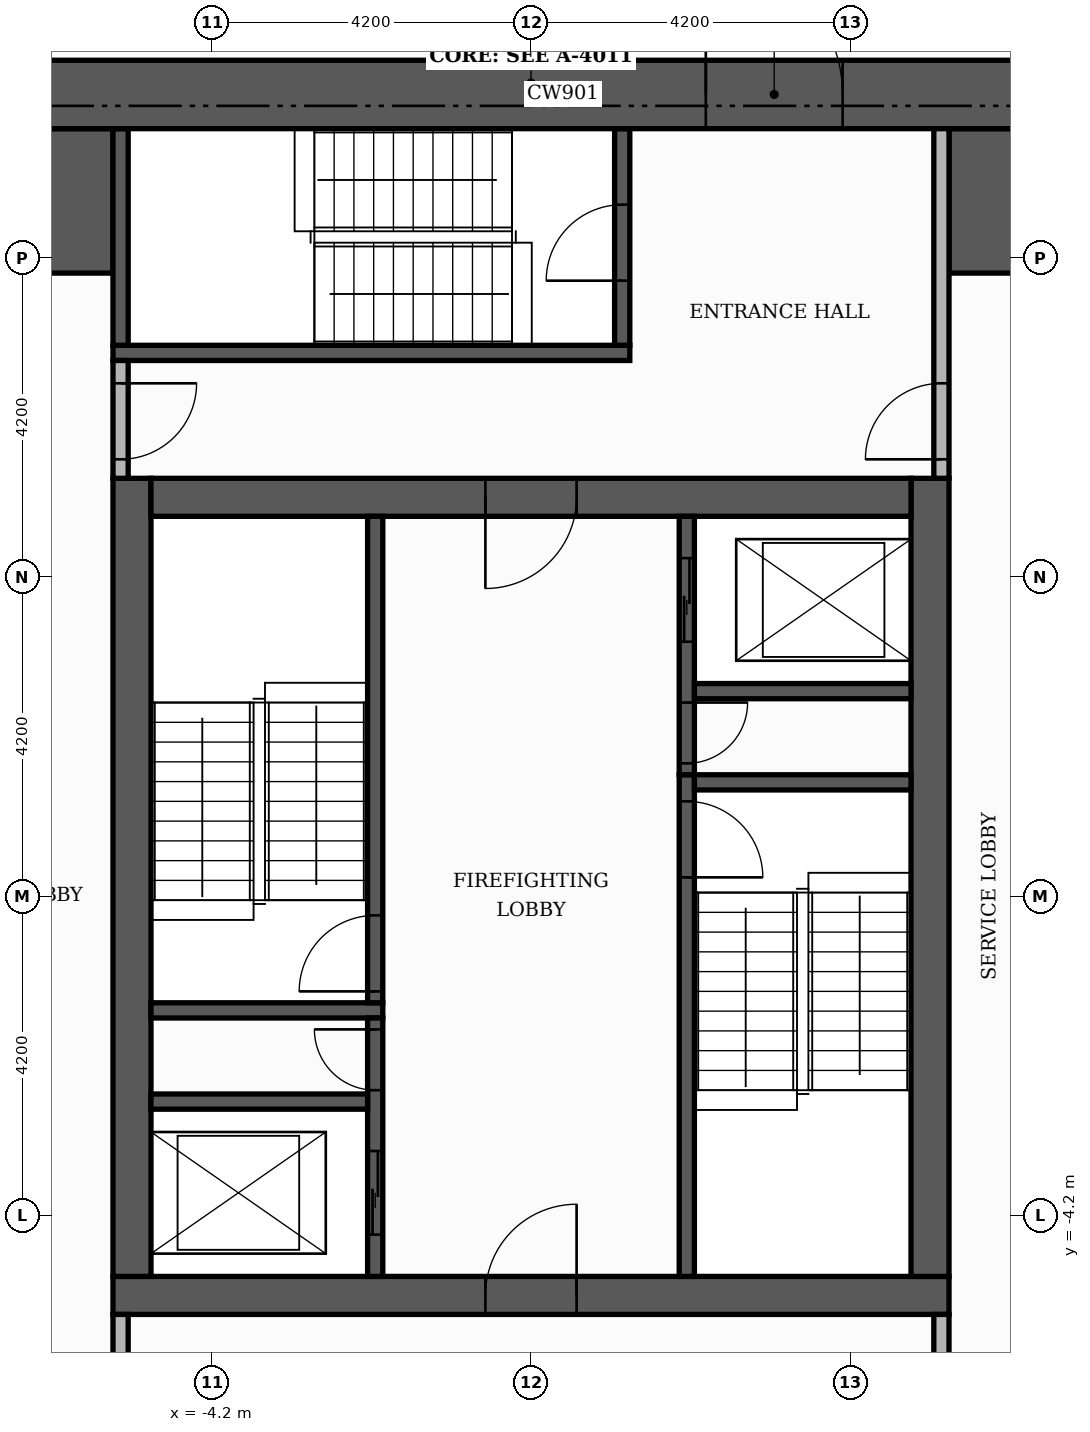
"""IFC4 building model, lengths in metres.
Left out: names, types, materials, properties, quantities, classifications, styles, units other than length and angle.
Written with IfcOpenShell. Run it as: python <this file> out.ifc"""

import sys

from ifc_helpers import new_model, si_unit, direction, frame, frame_2d, origin, place, context, subcontext, project, spatial, rectangle, extrude, element, fill, save


model = new_model("IFC4")
c1 = context("Model", 3, precision=1e-05, world=origin(), true_north=direction((0.0, 1.0)))
c2 = subcontext(c1, "Body", "Model", "MODEL_VIEW")
j1 = project(units=[si_unit("LENGTHUNIT", "METRE"), si_unit("PLANEANGLEUNIT", "RADIAN")], contexts=[c1])
p1 = place(None, origin())
s1 = spatial("IfcSite", under=j1, at=p1, CompositionType="ELEMENT")
p2 = place(p1, origin())
s2 = spatial("IfcBuilding", under=s1, at=p2, CompositionType="ELEMENT")
p3 = place(p2, frame((0.0, 0.0, 62.1)))
s3 = spatial("IfcBuildingStorey", under=s2, at=p3, CompositionType="ELEMENT", Elevation=62.1)
p4 = place(p3, frame((-5.5, -5.25, 0.0), z_axis=(0.0, 0.0, 1.0), x_axis=(1.0, 0.0, 0.0)))
e1 = element("IfcWall", 1, at=p4, inside=s3, PredefinedType="SHEAR", context=c2, shape_type="SweptSolid", body=[
    extrude(rectangle(XDim=11.0, YDim=0.5, at=frame_2d((5.5, 0.0))), origin(), (0.0, 0.0, 1.0), 3.48),
])
p5 = place(p4, frame((4.9, 0.0, 0.0)))
e2 = element("IfcOpeningElement", 2, at=p5, cuts=e1, PredefinedType="OPENING", context=c2, shape_type="SweptSolid", body=[
    extrude(rectangle(XDim=1.2, YDim=2.1, at=frame_2d((0.6, 1.05))), frame((0.0, 0.26, 0.0), z_axis=(0.0, -1.0, 0.0), x_axis=(1.0, 0.0, 0.0)), (0.0, 0.0, 1.0), 0.52),
])
for number, where, z_axis, x_axis in (
    (3, (-5.25, -5.0, 0.0), (0.0, 0.0, 1.0), (0.0, 1.0, 0.0)),
    (4, (5.25, -5.0, 0.0), (0.0, 0.0, 1.0), (0.0, 1.0, 0.0)),
):
    element("IfcWall", number, at=place(p3, frame(where, z_axis=z_axis, x_axis=x_axis)), inside=s3, PredefinedType="SHEAR", context=c2, shape_type="SweptSolid", body=[
        extrude(rectangle(XDim=10.5, YDim=0.5, at=frame_2d((5.25, 0.0))), origin(), (0.0, 0.0, 1.0), 3.48),
    ])
p6 = place(p3, frame((-5.0, 5.25, 0.0), z_axis=(0.0, 0.0, 1.0), x_axis=(1.0, 0.0, 0.0)))
e5 = element("IfcWall", 5, at=p6, inside=s3, PredefinedType="SHEAR", context=c2, shape_type="SweptSolid", body=[
    extrude(rectangle(XDim=10.0, YDim=0.5, at=frame_2d((5.0, 0.0))), origin(), (0.0, 0.0, 1.0), 3.48),
])
p7 = place(p6, frame((4.4, 0.0, 0.0)))
e6 = element("IfcOpeningElement", 6, at=p7, cuts=e5, PredefinedType="OPENING", context=c2, shape_type="SweptSolid", body=[
    extrude(rectangle(XDim=1.2, YDim=2.1, at=frame_2d((0.6, 1.05))), frame((0.0, 0.26, 0.0), z_axis=(0.0, -1.0, 0.0), x_axis=(1.0, 0.0, 0.0)), (0.0, 0.0, 1.0), 0.52),
])
for number, where, z_axis, x_axis in (
    (7, (-10.1, 9.15, 0.0), (0.0, 0.0, 1.0), (1.0, 0.0, 0.0)),
    (8, (5.5, 9.15, 0.0), (0.0, 0.0, 1.0), (1.0, 0.0, 0.0)),
):
    element("IfcWall", number, at=place(p3, frame(where, z_axis=z_axis, x_axis=x_axis)), inside=s3, PredefinedType="SHEAR", context=c2, shape_type="SweptSolid", body=[
        extrude(rectangle(XDim=4.6, YDim=1.9, at=frame_2d((2.3, 0.0))), origin(), (0.0, 0.0, 1.0), 3.48),
    ])
p8 = place(p3, frame((2.05, -5.0, 0.0), z_axis=(0.0, 0.0, 1.0), x_axis=(0.0, 1.0, 0.0)))
e9 = element("IfcWall", 9, at=p8, inside=s3, PredefinedType="SHEAR", context=c2, shape_type="SweptSolid", body=[
    extrude(rectangle(XDim=6.6, YDim=0.2, at=frame_2d((3.3, 0.0))), origin(), (0.0, 0.0, 1.0), 3.48),
])
p9 = place(p8, frame((5.25, 0.0, 0.0)))
e10 = element("IfcOpeningElement", 10, at=p9, cuts=e9, PredefinedType="OPENING", context=c2, shape_type="SweptSolid", body=[
    extrude(rectangle(XDim=1.0, YDim=2.1, at=frame_2d((0.5, 1.05))), frame((0.0, 0.11, 0.0), z_axis=(0.0, -1.0, 0.0), x_axis=(1.0, 0.0, 0.0)), (0.0, 0.0, 1.0), 0.22),
])
p10 = place(p3, frame((-5.0, -1.5, 0.0), z_axis=(0.0, 0.0, 1.0), x_axis=(1.0, 0.0, 0.0)))
e11 = element("IfcWall", 11, at=p10, inside=s3, PredefinedType="SHEAR", context=c2, shape_type="SweptSolid", body=[
    extrude(rectangle(XDim=3.05, YDim=0.2, at=frame_2d((1.525, 0.0))), origin(), (0.0, 0.0, 1.0), 3.48),
])
p11 = place(p3, frame((-2.05, -1.4, 0.0), z_axis=(0.0, 0.0, 1.0), x_axis=(0.0, 1.0, 0.0)))
e12 = element("IfcWall", 12, at=p11, inside=s3, PredefinedType="SHEAR", context=c2, shape_type="SweptSolid", body=[
    extrude(rectangle(XDim=6.4, YDim=0.2, at=frame_2d((3.2, 0.0))), origin(), (0.0, 0.0, 1.0), 3.48),
])
p12 = place(p11, frame((0.15, 0.0, 0.0)))
e13 = element("IfcOpeningElement", 13, at=p12, cuts=e12, PredefinedType="OPENING", context=c2, shape_type="SweptSolid", body=[
    extrude(rectangle(XDim=1.0, YDim=2.1, at=frame_2d((0.5, 1.05))), frame((0.0, 0.11, 0.0), z_axis=(0.0, -1.0, 0.0), x_axis=(1.0, 0.0, 0.0)), (0.0, 0.0, 1.0), 0.22),
])
p13 = place(p3, frame((2.15, 1.5, 0.0), z_axis=(0.0, 0.0, 1.0), x_axis=(1.0, 0.0, 0.0)))
e14 = element("IfcWall", 14, at=p13, inside=s3, PredefinedType="SHEAR", context=c2, shape_type="SweptSolid", body=[
    extrude(rectangle(XDim=2.85, YDim=0.2, at=frame_2d((1.425, 0.0))), origin(), (0.0, 0.0, 1.0), 3.48),
])
p14 = place(p3, frame((-5.5, 7.15, 0.0), z_axis=(0.0, 0.0, 1.0), x_axis=(1.0, 0.0, 0.0)))
e15 = element("IfcWall", 15, at=p14, inside=s3, PredefinedType="SHEAR", context=c2, shape_type="SweptSolid", body=[
    extrude(rectangle(XDim=6.8, YDim=0.2, at=frame_2d((3.4, 0.0))), origin(), (0.0, 0.0, 1.0), 3.48),
])
p15 = place(p3, frame((-5.4, 7.25, 0.0), z_axis=(0.0, 0.0, 1.0), x_axis=(0.0, 1.0, 0.0)))
e16 = element("IfcWall", 16, at=p15, inside=s3, PredefinedType="SHEAR", context=c2, shape_type="SweptSolid", body=[
    extrude(rectangle(XDim=2.85, YDim=0.2, at=frame_2d((1.425, 0.0))), origin(), (0.0, 0.0, 1.0), 3.48),
])
p16 = place(p3, frame((1.2, 7.25, 0.0), z_axis=(0.0, 0.0, 1.0), x_axis=(0.0, 1.0, 0.0)))
e17 = element("IfcWall", 17, at=p16, inside=s3, PredefinedType="SHEAR", context=c2, shape_type="SweptSolid", body=[
    extrude(rectangle(XDim=2.85, YDim=0.2, at=frame_2d((1.425, 0.0))), origin(), (0.0, 0.0, 1.0), 3.48),
])
p17 = place(p16, frame((0.85, 0.0, 0.0)))
e18 = element("IfcOpeningElement", 18, at=p17, cuts=e17, PredefinedType="OPENING", context=c2, shape_type="SweptSolid", body=[
    extrude(rectangle(XDim=1.0, YDim=2.1, at=frame_2d((0.5, 1.05))), frame((0.0, 0.11, 0.0), z_axis=(0.0, -1.0, 0.0), x_axis=(1.0, 0.0, 0.0)), (0.0, 0.0, 1.0), 0.22),
])
p18 = place(p3, frame((-2.05, -5.0, 0.0), z_axis=(0.0, 0.0, 1.0), x_axis=(0.0, 1.0, 0.0)))
e19 = element("IfcWall", 19, at=p18, inside=s3, PredefinedType="SHEAR", context=c2, shape_type="SweptSolid", body=[
    extrude(rectangle(XDim=3.4, YDim=0.2, at=frame_2d((1.7, 0.0))), origin(), (0.0, 0.0, 1.0), 3.48),
])
p19 = place(p18, frame((0.55, 0.0, 0.0)))
e20 = element("IfcOpeningElement", 20, at=p19, cuts=e19, PredefinedType="OPENING", context=c2, shape_type="SweptSolid", body=[
    extrude(rectangle(XDim=1.1, YDim=2.1, at=frame_2d((0.55, 1.05))), frame((0.0, 0.11, 0.0), z_axis=(0.0, -1.0, 0.0), x_axis=(1.0, 0.0, 0.0)), (0.0, 0.0, 1.0), 0.22),
])
p20 = place(p18, frame((2.45, 0.0, 0.0)))
e21 = element("IfcOpeningElement", 21, at=p20, cuts=e19, PredefinedType="OPENING", context=c2, shape_type="SweptSolid", body=[
    extrude(rectangle(XDim=0.8, YDim=2.1, at=frame_2d((0.4, 1.05))), frame((0.0, 0.11, 0.0), z_axis=(0.0, -1.0, 0.0), x_axis=(1.0, 0.0, 0.0)), (0.0, 0.0, 1.0), 0.22),
])
p21 = place(p3, frame((-5.0, -2.7, 0.0), z_axis=(0.0, 0.0, 1.0), x_axis=(1.0, 0.0, 0.0)))
e22 = element("IfcWall", 22, at=p21, inside=s3, PredefinedType="SHEAR", context=c2, shape_type="SweptSolid", body=[
    extrude(rectangle(XDim=2.85, YDim=0.2, at=frame_2d((1.425, 0.0))), origin(), (0.0, 0.0, 1.0), 3.48),
])
p22 = place(p3, frame((2.05, 1.6, 0.0), z_axis=(0.0, 0.0, 1.0), x_axis=(0.0, 1.0, 0.0)))
e23 = element("IfcWall", 23, at=p22, inside=s3, PredefinedType="SHEAR", context=c2, shape_type="SweptSolid", body=[
    extrude(rectangle(XDim=3.4, YDim=0.2, at=frame_2d((1.7, 0.0))), origin(), (0.0, 0.0, 1.0), 3.48),
])
p23 = place(p22, frame((1.75, 0.0, 0.0)))
e24 = element("IfcOpeningElement", 24, at=p23, cuts=e23, PredefinedType="OPENING", context=c2, shape_type="SweptSolid", body=[
    extrude(rectangle(XDim=1.1, YDim=2.1, at=frame_2d((0.55, 1.05))), frame((0.0, 0.11, 0.0), z_axis=(0.0, -1.0, 0.0), x_axis=(1.0, 0.0, 0.0)), (0.0, 0.0, 1.0), 0.22),
])
p24 = place(p22, frame((0.15, 0.0, 0.0)))
e25 = element("IfcOpeningElement", 25, at=p24, cuts=e23, PredefinedType="OPENING", context=c2, shape_type="SweptSolid", body=[
    extrude(rectangle(XDim=0.8, YDim=2.1, at=frame_2d((0.4, 1.05))), frame((0.0, 0.11, 0.0), z_axis=(0.0, -1.0, 0.0), x_axis=(1.0, 0.0, 0.0)), (0.0, 0.0, 1.0), 0.22),
])
p25 = place(p3, frame((2.15, 2.7, 0.0), z_axis=(0.0, 0.0, 1.0), x_axis=(1.0, 0.0, 0.0)))
e26 = element("IfcWall", 26, at=p25, inside=s3, PredefinedType="SHEAR", context=c2, shape_type="SweptSolid", body=[
    extrude(rectangle(XDim=2.85, YDim=0.2, at=frame_2d((1.425, 0.0))), origin(), (0.0, 0.0, 1.0), 3.48),
])
p26 = place(p3, frame((-11.0, 10.55, 0.0), z_axis=(0.0, 0.0, 1.0), x_axis=(1.0, 0.0, 0.0)))
e27 = element("IfcWall", 27, at=p26, inside=s3, PredefinedType="SHEAR", context=c2, shape_type="SweptSolid", body=[
    extrude(rectangle(XDim=22.0, YDim=0.9, at=frame_2d((11.0, 0.0))), origin(), (0.0, 0.0, 1.0), 3.48),
])
p27 = place(p26, frame((13.3, 0.0, 0.0)))
e28 = element("IfcOpeningElement", 28, at=p27, cuts=e27, PredefinedType="OPENING", context=c2, shape_type="SweptSolid", body=[
    extrude(rectangle(XDim=1.8, YDim=2.2, at=frame_2d((0.9, 1.1))), frame((0.0, 0.46, 0.0), z_axis=(0.0, -1.0, 0.0), x_axis=(1.0, 0.0, 0.0)), (0.0, 0.0, 1.0), 0.92),
])
p28 = place(p3, frame((-5.4, -10.1, 0.0), z_axis=(0.0, 0.0, 1.0), x_axis=(0.0, 1.0, 0.0)))
e29 = element("IfcWall", 29, at=p28, inside=s3, PredefinedType="PARTITIONING", context=c2, shape_type="SweptSolid", body=[
    extrude(rectangle(XDim=4.6, YDim=0.2, at=frame_2d((2.3, 0.0))), origin(), (0.0, 0.0, 1.0), 3.48),
])
p29 = place(p28, frame((2.9, 0.0, 0.0)))
e30 = element("IfcOpeningElement", 30, at=p29, cuts=e29, PredefinedType="OPENING", context=c2, shape_type="SweptSolid", body=[
    extrude(rectangle(XDim=1.0, YDim=2.1, at=frame_2d((0.5, 1.05))), frame((0.0, 0.11, 0.0), z_axis=(0.0, -1.0, 0.0), x_axis=(1.0, 0.0, 0.0)), (0.0, 0.0, 1.0), 0.22),
])
p30 = place(p3, frame((5.4, -7.9, 0.0), z_axis=(0.0, 0.0, 1.0), x_axis=(0.0, 1.0, 0.0)))
e31 = element("IfcWall", 31, at=p30, inside=s3, PredefinedType="PARTITIONING", context=c2, shape_type="SweptSolid", body=[
    extrude(rectangle(XDim=2.4, YDim=0.2, at=frame_2d((1.2, 0.0))), origin(), (0.0, 0.0, 1.0), 3.48),
])
p31 = place(p30, frame((0.7, 0.0, 0.0)))
e32 = element("IfcOpeningElement", 32, at=p31, cuts=e31, PredefinedType="OPENING", context=c2, shape_type="SweptSolid", body=[
    extrude(rectangle(XDim=1.0, YDim=2.1, at=frame_2d((0.5, 1.05))), frame((0.0, 0.11, 0.0), z_axis=(0.0, -1.0, 0.0), x_axis=(1.0, 0.0, 0.0)), (0.0, 0.0, 1.0), 0.22),
])
p32 = place(p3, frame((-5.4, 5.5, 0.0), z_axis=(0.0, 0.0, 1.0), x_axis=(0.0, 1.0, 0.0)))
e33 = element("IfcWall", 33, at=p32, inside=s3, PredefinedType="PARTITIONING", context=c2, shape_type="SweptSolid", body=[
    extrude(rectangle(XDim=1.55, YDim=0.2, at=frame_2d((0.775, 0.0))), origin(), (0.0, 0.0, 1.0), 3.48),
])
p33 = place(p32, frame((0.25, 0.0, 0.0)))
e34 = element("IfcOpeningElement", 34, at=p33, cuts=e33, PredefinedType="OPENING", context=c2, shape_type="SweptSolid", body=[
    extrude(rectangle(XDim=1.0, YDim=2.1, at=frame_2d((0.5, 1.05))), frame((0.0, 0.11, 0.0), z_axis=(0.0, -1.0, 0.0), x_axis=(1.0, 0.0, 0.0)), (0.0, 0.0, 1.0), 0.22),
])
p34 = place(p3, frame((5.4, 5.5, 0.0), z_axis=(0.0, 0.0, 1.0), x_axis=(0.0, 1.0, 0.0)))
e35 = element("IfcWall", 35, at=p34, inside=s3, PredefinedType="PARTITIONING", context=c2, shape_type="SweptSolid", body=[
    extrude(rectangle(XDim=4.6, YDim=0.2, at=frame_2d((2.3, 0.0))), origin(), (0.0, 0.0, 1.0), 3.48),
])
p35 = place(p34, frame((0.25, 0.0, 0.0)))
e36 = element("IfcOpeningElement", 36, at=p35, cuts=e35, PredefinedType="OPENING", context=c2, shape_type="SweptSolid", body=[
    extrude(rectangle(XDim=1.0, YDim=2.1, at=frame_2d((0.5, 1.05))), frame((0.0, 0.11, 0.0), z_axis=(0.0, -1.0, 0.0), x_axis=(1.0, 0.0, 0.0)), (0.0, 0.0, 1.0), 0.22),
])
p36 = place(p23, origin())
e37 = element("IfcDoor", 37, at=p36, inside=s3, OperationType="SLIDING_TO_LEFT", PredefinedType="DOOR", context=c2, shape_type="SweptSolid", body=[
    extrude(rectangle(XDim=1.1, YDim=2.1, at=frame_2d((0.55, 1.05))), frame((0.0, 0.025, 0.0), z_axis=(0.0, -1.0, 0.0), x_axis=(1.0, 0.0, 0.0)), (0.0, 0.0, 1.0), 0.05),
])
fill(e24, e37)
p37 = place(p19, origin())
e38 = element("IfcDoor", 38, at=p37, inside=s3, OperationType="SLIDING_TO_LEFT", PredefinedType="DOOR", context=c2, shape_type="SweptSolid", body=[
    extrude(rectangle(XDim=1.1, YDim=2.1, at=frame_2d((0.55, 1.05))), frame((0.0, 0.025, 0.0), z_axis=(0.0, -1.0, 0.0), x_axis=(1.0, 0.0, 0.0)), (0.0, 0.0, 1.0), 0.05),
])
fill(e20, e38)
p38 = place(p12, origin())
e39 = element("IfcDoor", 39, at=p38, inside=s3, OperationType="SINGLE_SWING_LEFT", PredefinedType="DOOR", context=c2, shape_type="SweptSolid", body=[
    extrude(rectangle(XDim=1.0, YDim=2.1, at=frame_2d((0.5, 1.05))), frame((0.0, 0.025, 0.0), z_axis=(0.0, -1.0, 0.0), x_axis=(1.0, 0.0, 0.0)), (0.0, 0.0, 1.0), 0.05),
])
fill(e13, e39)
p39 = place(p9, frame((1.0, 0.0, 0.0), z_axis=(0.0, 0.0, 1.0), x_axis=(-1.0, 0.0, 0.0)))
e40 = element("IfcDoor", 40, at=p39, inside=s3, OperationType="SINGLE_SWING_LEFT", PredefinedType="DOOR", context=c2, shape_type="SweptSolid", body=[
    extrude(rectangle(XDim=1.0, YDim=2.1, at=frame_2d((0.5, 1.05))), frame((0.0, 0.025, 0.0), z_axis=(0.0, -1.0, 0.0), x_axis=(1.0, 0.0, 0.0)), (0.0, 0.0, 1.0), 0.05),
])
fill(e10, e40)
p40 = place(p24, frame((0.8, 0.0, 0.0), z_axis=(0.0, 0.0, 1.0), x_axis=(-1.0, 0.0, 0.0)))
e41 = element("IfcDoor", 41, at=p40, inside=s3, OperationType="SINGLE_SWING_RIGHT", PredefinedType="DOOR", context=c2, shape_type="SweptSolid", body=[
    extrude(rectangle(XDim=0.8, YDim=2.1, at=frame_2d((0.4, 1.05))), frame((0.0, 0.025, 0.0), z_axis=(0.0, -1.0, 0.0), x_axis=(1.0, 0.0, 0.0)), (0.0, 0.0, 1.0), 0.05),
])
fill(e25, e41)
p41 = place(p20, origin())
e42 = element("IfcDoor", 42, at=p41, inside=s3, OperationType="SINGLE_SWING_RIGHT", PredefinedType="DOOR", context=c2, shape_type="SweptSolid", body=[
    extrude(rectangle(XDim=0.8, YDim=2.1, at=frame_2d((0.4, 1.05))), frame((0.0, 0.025, 0.0), z_axis=(0.0, -1.0, 0.0), x_axis=(1.0, 0.0, 0.0)), (0.0, 0.0, 1.0), 0.05),
])
fill(e21, e42)
p42 = place(p7, frame((1.2, 0.0, 0.0), z_axis=(0.0, 0.0, 1.0), x_axis=(-1.0, 0.0, 0.0)))
e43 = element("IfcDoor", 43, at=p42, inside=s3, OperationType="SINGLE_SWING_LEFT", PredefinedType="DOOR", context=c2, shape_type="SweptSolid", body=[
    extrude(rectangle(XDim=1.2, YDim=2.1, at=frame_2d((0.6, 1.05))), frame((0.0, 0.025, 0.0), z_axis=(0.0, -1.0, 0.0), x_axis=(1.0, 0.0, 0.0)), (0.0, 0.0, 1.0), 0.05),
])
fill(e6, e43)
p43 = place(p5, origin())
e44 = element("IfcDoor", 44, at=p43, inside=s3, OperationType="SINGLE_SWING_RIGHT", PredefinedType="DOOR", context=c2, shape_type="SweptSolid", body=[
    extrude(rectangle(XDim=1.2, YDim=2.1, at=frame_2d((0.6, 1.05))), frame((0.0, 0.025, 0.0), z_axis=(0.0, -1.0, 0.0), x_axis=(1.0, 0.0, 0.0)), (0.0, 0.0, 1.0), 0.05),
])
fill(e2, e44)
p44 = place(p17, origin())
e45 = element("IfcDoor", 45, at=p44, inside=s3, OperationType="SINGLE_SWING_LEFT", PredefinedType="DOOR", context=c2, shape_type="SweptSolid", body=[
    extrude(rectangle(XDim=1.0, YDim=2.1, at=frame_2d((0.5, 1.05))), frame((0.0, 0.025, 0.0), z_axis=(0.0, -1.0, 0.0), x_axis=(1.0, 0.0, 0.0)), (0.0, 0.0, 1.0), 0.05),
])
fill(e18, e45)
p45 = place(p33, frame((1.0, 0.0, 0.0), z_axis=(0.0, 0.0, 1.0), x_axis=(-1.0, 0.0, 0.0)))
e46 = element("IfcDoor", 46, at=p45, inside=s3, OperationType="SINGLE_SWING_RIGHT", PredefinedType="DOOR", context=c2, shape_type="SweptSolid", body=[
    extrude(rectangle(XDim=1.0, YDim=2.1, at=frame_2d((0.5, 1.05))), frame((0.0, 0.025, 0.0), z_axis=(0.0, -1.0, 0.0), x_axis=(1.0, 0.0, 0.0)), (0.0, 0.0, 1.0), 0.05),
])
fill(e34, e46)
p46 = place(p35, origin())
e47 = element("IfcDoor", 47, at=p46, inside=s3, OperationType="SINGLE_SWING_LEFT", PredefinedType="DOOR", context=c2, shape_type="SweptSolid", body=[
    extrude(rectangle(XDim=1.0, YDim=2.1, at=frame_2d((0.5, 1.05))), frame((0.0, 0.025, 0.0), z_axis=(0.0, -1.0, 0.0), x_axis=(1.0, 0.0, 0.0)), (0.0, 0.0, 1.0), 0.05),
])
fill(e36, e47)
p47 = place(p27, origin())
e48 = element("IfcDoor", 48, at=p47, inside=s3, OperationType="DOUBLE_DOOR_SINGLE_SWING", PredefinedType="DOOR", context=c2, shape_type="SweptSolid", body=[
    extrude(rectangle(XDim=1.8, YDim=2.2, at=frame_2d((0.9, 1.1))), frame((0.0, 0.025, 0.0), z_axis=(0.0, -1.0, 0.0), x_axis=(1.0, 0.0, 0.0)), (0.0, 0.0, 1.0), 0.05),
])
fill(e28, e48)
save(model, sys.argv[1])
